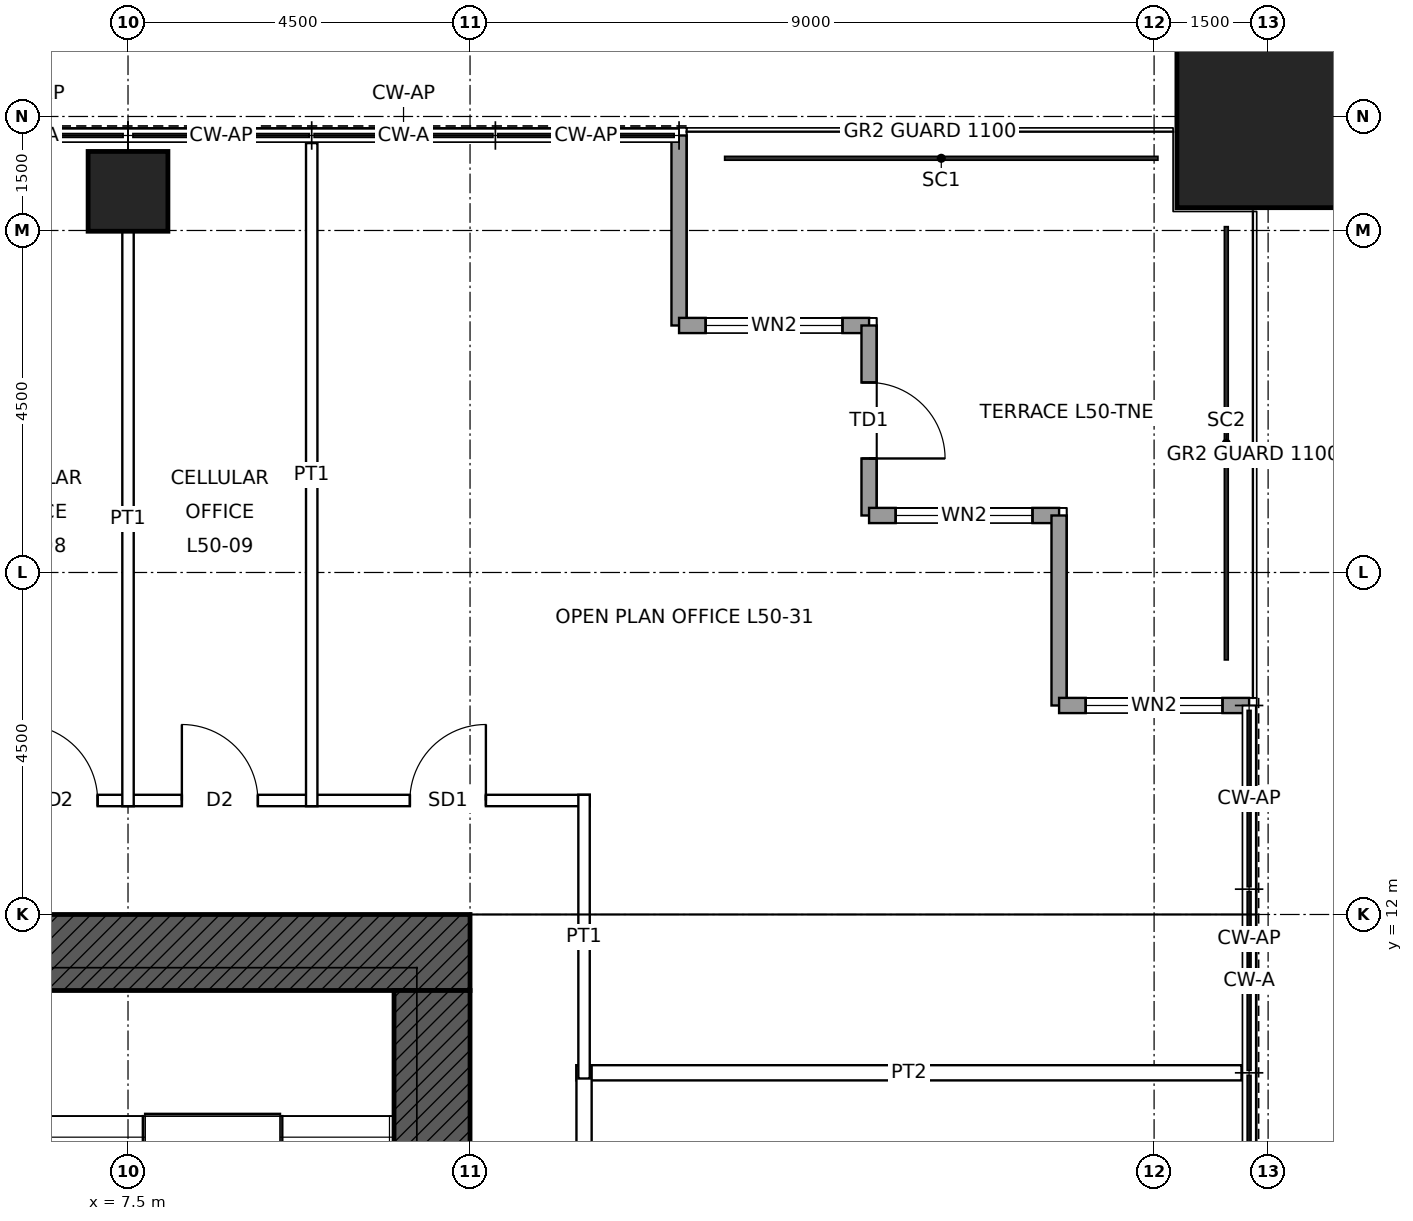
"""IFC4 building model, lengths in metres.
Left out: names, types, materials, properties, quantities, classifications, styles, units other than length and angle.
Written with IfcOpenShell. Run it as: python <this file> out.ifc"""

import sys

from ifc_helpers import new_model, si_unit, direction, frame, frame_2d, origin, origin_2d, place, context, subcontext, project, spatial, rectangle, hollow_rectangle, extrude, element, fill, save


model = new_model("IFC4")
c1 = context("Model", 3, precision=1e-05, world=origin(), true_north=direction((0.0, 1.0)))
c2 = subcontext(c1, "Body", "Model", "MODEL_VIEW")
j1 = project(units=[si_unit("LENGTHUNIT", "METRE"), si_unit("PLANEANGLEUNIT", "RADIAN")], contexts=[c1])
p1 = place(None, origin())
s1 = spatial("IfcSite", under=j1, at=p1, CompositionType="ELEMENT")
p2 = place(p1, origin())
s2 = spatial("IfcBuilding", under=s1, at=p2, CompositionType="ELEMENT")
p3 = place(p2, frame((0.0, 0.0, 233.9)))
s3 = spatial("IfcBuildingStorey", under=s2, at=p3, CompositionType="ELEMENT", Elevation=233.9)
p4 = place(p3, frame((22.5, 22.5, 0.0), z_axis=(0.0, 0.0, 1.0), x_axis=(1.0, 0.0, 0.0)))
e1 = element("IfcColumn", 1, at=p4, inside=s3, PredefinedType="COLUMN", context=c2, shape_type="SweptSolid", body=[
    extrude(hollow_rectangle(XDim=2.4, YDim=2.4, WallThickness=0.12, at=origin_2d()), origin(), (0.0, 0.0, 1.0), 4.0),
])
p5 = place(p3, frame((7.5, 21.515, 0.0), z_axis=(0.0, 0.0, 1.0), x_axis=(1.0, 0.0, 0.0)))
e2 = element("IfcColumn", 2, at=p5, inside=s3, PredefinedType="COLUMN", context=c2, shape_type="SweptSolid", body=[
    extrude(hollow_rectangle(XDim=1.05, YDim=1.05, WallThickness=0.07, at=origin_2d()), origin(), (0.0, 0.0, 1.0), 4.0),
])
p6 = place(p3, frame((-12.0, 11.5, 0.0), z_axis=(0.0, 0.0, 1.0), x_axis=(1.0, 0.0, 0.0)))
e3 = element("IfcWall", 3, at=p6, inside=s3, PredefinedType="SHEAR", context=c2, shape_type="SweptSolid", body=[
    extrude(rectangle(XDim=24.0, YDim=1.0, at=frame_2d((12.0, 0.0))), origin(), (0.0, 0.0, 1.0), 4.0),
])
p7 = place(p6, frame((6.25, 0.0, 0.0)))
e4 = element("IfcOpeningElement", 4, at=p7, cuts=e3, PredefinedType="OPENING", context=c2, shape_type="SweptSolid", body=[
    extrude(rectangle(XDim=1.0, YDim=2.4, at=frame_2d((0.5, 1.2))), frame((0.0, 0.51, 0.0), z_axis=(0.0, -1.0, 0.0), x_axis=(1.0, 0.0, 0.0)), (0.0, 0.0, 1.0), 1.02),
])
p8 = place(p6, frame((16.75, 0.0, 0.0)))
e5 = element("IfcOpeningElement", 5, at=p8, cuts=e3, PredefinedType="OPENING", context=c2, shape_type="SweptSolid", body=[
    extrude(rectangle(XDim=1.0, YDim=2.4, at=frame_2d((0.5, 1.2))), frame((0.0, 0.51, 0.0), z_axis=(0.0, -1.0, 0.0), x_axis=(1.0, 0.0, 0.0)), (0.0, 0.0, 1.0), 1.02),
])
p9 = place(p3, frame((11.5, 11.0, 0.0), z_axis=(0.0, 0.0, 1.0), x_axis=(0.0, -1.0, 0.0)))
e6 = element("IfcWall", 6, at=p9, inside=s3, PredefinedType="SHEAR", context=c2, shape_type="SweptSolid", body=[
    extrude(rectangle(XDim=22.0, YDim=1.0, at=frame_2d((11.0, 0.0))), origin(), (0.0, 0.0, 1.0), 4.0),
])
p10 = place(p9, frame((10.5, 0.0, 0.0)))
e7 = element("IfcOpeningElement", 7, at=p10, cuts=e6, PredefinedType="OPENING", context=c2, shape_type="SweptSolid", body=[
    extrude(rectangle(XDim=1.0, YDim=2.4, at=frame_2d((0.5, 1.2))), frame((0.0, 0.51, 0.0), z_axis=(0.0, -1.0, 0.0), x_axis=(1.0, 0.0, 0.0)), (0.0, 0.0, 1.0), 1.02),
])
p11 = place(p3, frame((14.75, 22.25, 0.0), z_axis=(0.0, 0.0, 1.0), x_axis=(0.0, -1.0, 0.0)))
e8 = element("IfcWall", 8, at=p11, inside=s3, PredefinedType="SOLIDWALL", context=c2, shape_type="SweptSolid", body=[
    extrude(rectangle(XDim=2.5, YDim=0.2, at=frame_2d((1.25, 0.0))), origin(), (0.0, 0.0, 1.0), 3.85),
])
p12 = place(p3, frame((14.75, 19.75, 0.0), z_axis=(0.0, 0.0, 1.0), x_axis=(1.0, 0.0, 0.0)))
e9 = element("IfcWall", 9, at=p12, inside=s3, PredefinedType="SOLIDWALL", context=c2, shape_type="SweptSolid", body=[
    extrude(rectangle(XDim=2.5, YDim=0.2, at=frame_2d((1.25, 0.0))), origin(), (0.0, 0.0, 1.0), 3.85),
])
p13 = place(p12, frame((0.35, 0.0, 0.3)))
e10 = element("IfcOpeningElement", 10, at=p13, cuts=e9, PredefinedType="OPENING", context=c2, shape_type="SweptSolid", body=[
    extrude(rectangle(XDim=1.8, YDim=2.4, at=frame_2d((0.9, 1.2))), frame((0.0, 0.11, 0.0), z_axis=(0.0, -1.0, 0.0), x_axis=(1.0, 0.0, 0.0)), (0.0, 0.0, 1.0), 0.22),
])
p14 = place(p3, frame((17.25, 19.75, 0.0), z_axis=(0.0, 0.0, 1.0), x_axis=(0.0, -1.0, 0.0)))
e11 = element("IfcWall", 11, at=p14, inside=s3, PredefinedType="SOLIDWALL", context=c2, shape_type="SweptSolid", body=[
    extrude(rectangle(XDim=2.5, YDim=0.2, at=frame_2d((1.25, 0.0))), origin(), (0.0, 0.0, 1.0), 3.85),
])
p15 = place(p14, frame((0.75, 0.0, 0.0)))
e12 = element("IfcOpeningElement", 12, at=p15, cuts=e11, PredefinedType="OPENING", context=c2, shape_type="SweptSolid", body=[
    extrude(rectangle(XDim=1.0, YDim=2.4, at=frame_2d((0.5, 1.2))), frame((0.0, 0.11, 0.0), z_axis=(0.0, -1.0, 0.0), x_axis=(1.0, 0.0, 0.0)), (0.0, 0.0, 1.0), 0.22),
])
p16 = place(p3, frame((17.25, 17.25, 0.0), z_axis=(0.0, 0.0, 1.0), x_axis=(1.0, 0.0, 0.0)))
e13 = element("IfcWall", 13, at=p16, inside=s3, PredefinedType="SOLIDWALL", context=c2, shape_type="SweptSolid", body=[
    extrude(rectangle(XDim=2.5, YDim=0.2, at=frame_2d((1.25, 0.0))), origin(), (0.0, 0.0, 1.0), 3.85),
])
p17 = place(p16, frame((0.35, 0.0, 0.3)))
e14 = element("IfcOpeningElement", 14, at=p17, cuts=e13, PredefinedType="OPENING", context=c2, shape_type="SweptSolid", body=[
    extrude(rectangle(XDim=1.8, YDim=2.4, at=frame_2d((0.9, 1.2))), frame((0.0, 0.11, 0.0), z_axis=(0.0, -1.0, 0.0), x_axis=(1.0, 0.0, 0.0)), (0.0, 0.0, 1.0), 0.22),
])
p18 = place(p3, frame((19.75, 17.25, 0.0), z_axis=(0.0, 0.0, 1.0), x_axis=(0.0, -1.0, 0.0)))
e15 = element("IfcWall", 15, at=p18, inside=s3, PredefinedType="SOLIDWALL", context=c2, shape_type="SweptSolid", body=[
    extrude(rectangle(XDim=2.5, YDim=0.2, at=frame_2d((1.25, 0.0))), origin(), (0.0, 0.0, 1.0), 3.85),
])
p19 = place(p3, frame((19.75, 14.75, 0.0), z_axis=(0.0, 0.0, 1.0), x_axis=(1.0, 0.0, 0.0)))
e16 = element("IfcWall", 16, at=p19, inside=s3, PredefinedType="SOLIDWALL", context=c2, shape_type="SweptSolid", body=[
    extrude(rectangle(XDim=2.5, YDim=0.2, at=frame_2d((1.25, 0.0))), origin(), (0.0, 0.0, 1.0), 3.85),
])
p20 = place(p19, frame((0.35, 0.0, 0.3)))
e17 = element("IfcOpeningElement", 17, at=p20, cuts=e16, PredefinedType="OPENING", context=c2, shape_type="SweptSolid", body=[
    extrude(rectangle(XDim=1.8, YDim=2.4, at=frame_2d((0.9, 1.2))), frame((0.0, 0.11, 0.0), z_axis=(0.0, -1.0, 0.0), x_axis=(1.0, 0.0, 0.0)), (0.0, 0.0, 1.0), 0.22),
])
p21 = place(p3, frame((13.4, 9.917, 0.0), z_axis=(0.0, 0.0, 1.0), x_axis=(1.0, 0.0, 0.0)))
e18 = element("IfcWall", 18, at=p21, inside=s3, PredefinedType="PARTITIONING", context=c2, shape_type="SweptSolid", body=[
    extrude(rectangle(XDim=8.75, YDim=0.2, at=frame_2d((4.375, 0.0))), origin(), (0.0, 0.0, 1.0), 3.85),
])
p22 = place(p3, frame((-13.575, 13.5, 0.0), z_axis=(0.0, 0.0, 1.0), x_axis=(1.0, 0.0, 0.0)))
e19 = element("IfcWall", 19, at=p22, inside=s3, PredefinedType="PARTITIONING", context=c2, shape_type="SweptSolid", body=[
    extrude(rectangle(XDim=27.15, YDim=0.15, at=frame_2d((13.575, 0.0))), origin(), (0.0, 0.0, 1.0), 3.85),
])
p23 = place(p22, frame((4.366, 0.0, 0.0)))
e20 = element("IfcOpeningElement", 20, at=p23, cuts=e19, PredefinedType="OPENING", context=c2, shape_type="SweptSolid", body=[
    extrude(rectangle(XDim=1.0, YDim=2.1, at=frame_2d((0.5, 1.05))), frame((0.0, 0.085, 0.0), z_axis=(0.0, -1.0, 0.0), x_axis=(1.0, 0.0, 0.0)), (0.0, 0.0, 1.0), 0.17),
])
p24 = place(p22, frame((6.475, 0.0, 0.0)))
e21 = element("IfcOpeningElement", 21, at=p24, cuts=e19, PredefinedType="OPENING", context=c2, shape_type="SweptSolid", body=[
    extrude(rectangle(XDim=1.0, YDim=2.1, at=frame_2d((0.5, 1.05))), frame((0.0, 0.085, 0.0), z_axis=(0.0, -1.0, 0.0), x_axis=(1.0, 0.0, 0.0)), (0.0, 0.0, 1.0), 0.17),
])
p25 = place(p22, frame((9.465, 0.0, 0.0)))
e22 = element("IfcOpeningElement", 22, at=p25, cuts=e19, PredefinedType="OPENING", context=c2, shape_type="SweptSolid", body=[
    extrude(rectangle(XDim=1.0, YDim=2.1, at=frame_2d((0.5, 1.05))), frame((0.0, 0.085, 0.0), z_axis=(0.0, -1.0, 0.0), x_axis=(1.0, 0.0, 0.0)), (0.0, 0.0, 1.0), 0.17),
])
p26 = place(p22, frame((11.825, 0.0, 0.0)))
e23 = element("IfcOpeningElement", 23, at=p26, cuts=e19, PredefinedType="OPENING", context=c2, shape_type="SweptSolid", body=[
    extrude(rectangle(XDim=1.0, YDim=2.1, at=frame_2d((0.5, 1.05))), frame((0.0, 0.085, 0.0), z_axis=(0.0, -1.0, 0.0), x_axis=(1.0, 0.0, 0.0)), (0.0, 0.0, 1.0), 0.17),
])
p27 = place(p22, frame((14.325, 0.0, 0.0)))
e24 = element("IfcOpeningElement", 24, at=p27, cuts=e19, PredefinedType="OPENING", context=c2, shape_type="SweptSolid", body=[
    extrude(rectangle(XDim=1.0, YDim=2.1, at=frame_2d((0.5, 1.05))), frame((0.0, 0.085, 0.0), z_axis=(0.0, -1.0, 0.0), x_axis=(1.0, 0.0, 0.0)), (0.0, 0.0, 1.0), 0.17),
])
p28 = place(p22, frame((16.475, 0.0, 0.0)))
e25 = element("IfcOpeningElement", 25, at=p28, cuts=e19, PredefinedType="OPENING", context=c2, shape_type="SweptSolid", body=[
    extrude(rectangle(XDim=1.0, YDim=2.1, at=frame_2d((0.5, 1.05))), frame((0.0, 0.085, 0.0), z_axis=(0.0, -1.0, 0.0), x_axis=(1.0, 0.0, 0.0)), (0.0, 0.0, 1.0), 0.17),
])
p29 = place(p22, frame((19.675, 0.0, 0.0)))
e26 = element("IfcOpeningElement", 26, at=p29, cuts=e19, PredefinedType="OPENING", context=c2, shape_type="SweptSolid", body=[
    extrude(rectangle(XDim=1.0, YDim=2.1, at=frame_2d((0.5, 1.05))), frame((0.0, 0.085, 0.0), z_axis=(0.0, -1.0, 0.0), x_axis=(1.0, 0.0, 0.0)), (0.0, 0.0, 1.0), 0.17),
])
p30 = place(p22, frame((21.783, 0.0, 0.0)))
e27 = element("IfcOpeningElement", 27, at=p30, cuts=e19, PredefinedType="OPENING", context=c2, shape_type="SweptSolid", body=[
    extrude(rectangle(XDim=1.0, YDim=2.1, at=frame_2d((0.5, 1.05))), frame((0.0, 0.085, 0.0), z_axis=(0.0, -1.0, 0.0), x_axis=(1.0, 0.0, 0.0)), (0.0, 0.0, 1.0), 0.17),
])
p31 = place(p22, frame((24.783, 0.0, 0.0)))
e28 = element("IfcOpeningElement", 28, at=p31, cuts=e19, PredefinedType="OPENING", context=c2, shape_type="SweptSolid", body=[
    extrude(rectangle(XDim=1.0, YDim=2.4, at=frame_2d((0.5, 1.2))), frame((0.0, 0.085, 0.0), z_axis=(0.0, -1.0, 0.0), x_axis=(1.0, 0.0, 0.0)), (0.0, 0.0, 1.0), 0.17),
])
p32 = place(p22, frame((1.366, 0.0, 0.0)))
e29 = element("IfcOpeningElement", 29, at=p32, cuts=e19, PredefinedType="OPENING", context=c2, shape_type="SweptSolid", body=[
    extrude(rectangle(XDim=1.0, YDim=2.4, at=frame_2d((0.5, 1.2))), frame((0.0, 0.085, 0.0), z_axis=(0.0, -1.0, 0.0), x_axis=(1.0, 0.0, 0.0)), (0.0, 0.0, 1.0), 0.17),
])
p33 = place(p3, frame((7.5, 13.425, 0.0), z_axis=(0.0, 0.0, 1.0), x_axis=(0.0, 1.0, 0.0)))
e30 = element("IfcWall", 30, at=p33, inside=s3, PredefinedType="PARTITIONING", context=c2, shape_type="SweptSolid", body=[
    extrude(rectangle(XDim=7.565, YDim=0.15, at=frame_2d((3.782, 0.0))), origin(), (0.0, 0.0, 1.0), 3.238),
])
p34 = place(p3, frame((9.917, 13.425, 0.0), z_axis=(0.0, 0.0, 1.0), x_axis=(0.0, 1.0, 0.0)))
e31 = element("IfcWall", 31, at=p34, inside=s3, PredefinedType="PARTITIONING", context=c2, shape_type="SweptSolid", body=[
    extrude(rectangle(XDim=8.725, YDim=0.15, at=frame_2d((4.362, 0.0))), origin(), (0.0, 0.0, 1.0), 3.85),
])
p35 = place(p3, frame((13.5, -5.1, 0.0), z_axis=(0.0, 0.0, 1.0), x_axis=(0.0, 1.0, 0.0)))
e32 = element("IfcWall", 32, at=p35, inside=s3, PredefinedType="PARTITIONING", context=c2, shape_type="SweptSolid", body=[
    extrude(rectangle(XDim=15.117, YDim=0.2, at=frame_2d((7.559, 0.0))), origin(), (0.0, 0.0, 1.0), 3.85),
])
p36 = place(p35, frame((12.059, 0.0, 0.0)))
e33 = element("IfcOpeningElement", 33, at=p36, cuts=e32, PredefinedType="OPENING", context=c2, shape_type="SweptSolid", body=[
    extrude(rectangle(XDim=1.0, YDim=2.1, at=frame_2d((0.5, 1.05))), frame((0.0, 0.11, 0.0), z_axis=(0.0, -1.0, 0.0), x_axis=(1.0, 0.0, 0.0)), (0.0, 0.0, 1.0), 0.22),
])
p37 = place(p35, frame((7.1, 0.0, 0.0)))
e34 = element("IfcOpeningElement", 34, at=p37, cuts=e32, PredefinedType="OPENING", context=c2, shape_type="SweptSolid", body=[
    extrude(rectangle(XDim=1.0, YDim=2.1, at=frame_2d((0.5, 1.05))), frame((0.0, 0.11, 0.0), z_axis=(0.0, -1.0, 0.0), x_axis=(1.0, 0.0, 0.0)), (0.0, 0.0, 1.0), 0.22),
])
p38 = place(p35, frame((2.1, 0.0, 0.0)))
e35 = element("IfcOpeningElement", 35, at=p38, cuts=e32, PredefinedType="OPENING", context=c2, shape_type="SweptSolid", body=[
    extrude(rectangle(XDim=1.0, YDim=2.1, at=frame_2d((0.5, 1.05))), frame((0.0, 0.11, 0.0), z_axis=(0.0, -1.0, 0.0), x_axis=(1.0, 0.0, 0.0)), (0.0, 0.0, 1.0), 0.22),
])
p39 = place(p3, frame((13.5, 9.842, 0.0), z_axis=(0.0, 0.0, 1.0), x_axis=(0.0, 1.0, 0.0)))
e36 = element("IfcWall", 36, at=p39, inside=s3, PredefinedType="PARTITIONING", context=c2, shape_type="SweptSolid", body=[
    extrude(rectangle(XDim=3.733, YDim=0.15, at=frame_2d((1.866, 0.0))), origin(), (0.0, 0.0, 1.0), 3.85),
])
p40 = place(p13, origin())
e37 = element("IfcWindow", 37, at=p40, inside=s3, PartitioningType="SINGLE_PANEL", PredefinedType="WINDOW", context=c2, shape_type="SweptSolid", body=[
    extrude(rectangle(XDim=1.8, YDim=2.4, at=frame_2d((0.9, 1.2))), frame((0.0, 0.03, 0.0), z_axis=(0.0, -1.0, 0.0), x_axis=(1.0, 0.0, 0.0)), (0.0, 0.0, 1.0), 0.06),
])
fill(e10, e37)
p41 = place(p15, origin())
e38 = element("IfcDoor", 38, at=p41, inside=s3, OperationType="SINGLE_SWING_RIGHT", PredefinedType="DOOR", context=c2, shape_type="SweptSolid", body=[
    extrude(rectangle(XDim=1.0, YDim=2.4, at=frame_2d((0.5, 1.2))), frame((0.0, 0.025, 0.0), z_axis=(0.0, -1.0, 0.0), x_axis=(1.0, 0.0, 0.0)), (0.0, 0.0, 1.0), 0.05),
])
fill(e12, e38)
p42 = place(p17, origin())
e39 = element("IfcWindow", 39, at=p42, inside=s3, PartitioningType="SINGLE_PANEL", PredefinedType="WINDOW", context=c2, shape_type="SweptSolid", body=[
    extrude(rectangle(XDim=1.8, YDim=2.4, at=frame_2d((0.9, 1.2))), frame((0.0, 0.03, 0.0), z_axis=(0.0, -1.0, 0.0), x_axis=(1.0, 0.0, 0.0)), (0.0, 0.0, 1.0), 0.06),
])
fill(e14, e39)
p43 = place(p20, origin())
e40 = element("IfcWindow", 40, at=p43, inside=s3, PartitioningType="SINGLE_PANEL", PredefinedType="WINDOW", context=c2, shape_type="SweptSolid", body=[
    extrude(rectangle(XDim=1.8, YDim=2.4, at=frame_2d((0.9, 1.2))), frame((0.0, 0.03, 0.0), z_axis=(0.0, -1.0, 0.0), x_axis=(1.0, 0.0, 0.0)), (0.0, 0.0, 1.0), 0.06),
])
fill(e17, e40)
p44 = place(p29, origin())
e41 = element("IfcDoor", 41, at=p44, inside=s3, OperationType="SINGLE_SWING_LEFT", PredefinedType="DOOR", context=c2, shape_type="SweptSolid", body=[
    extrude(rectangle(XDim=1.0, YDim=2.1, at=frame_2d((0.5, 1.05))), frame((0.0, 0.025, 0.0), z_axis=(0.0, -1.0, 0.0), x_axis=(1.0, 0.0, 0.0)), (0.0, 0.0, 1.0), 0.05),
])
fill(e26, e41)
p45 = place(p30, origin())
e42 = element("IfcDoor", 42, at=p45, inside=s3, OperationType="SINGLE_SWING_LEFT", PredefinedType="DOOR", context=c2, shape_type="SweptSolid", body=[
    extrude(rectangle(XDim=1.0, YDim=2.1, at=frame_2d((0.5, 1.05))), frame((0.0, 0.025, 0.0), z_axis=(0.0, -1.0, 0.0), x_axis=(1.0, 0.0, 0.0)), (0.0, 0.0, 1.0), 0.05),
])
fill(e27, e42)
p46 = place(p31, origin())
e43 = element("IfcDoor", 43, at=p46, inside=s3, OperationType="SINGLE_SWING_RIGHT", PredefinedType="DOOR", context=c2, shape_type="SweptSolid", body=[
    extrude(rectangle(XDim=1.0, YDim=2.4, at=frame_2d((0.5, 1.2))), frame((0.0, 0.025, 0.0), z_axis=(0.0, -1.0, 0.0), x_axis=(1.0, 0.0, 0.0)), (0.0, 0.0, 1.0), 0.05),
])
fill(e28, e43)
save(model, sys.argv[1])
